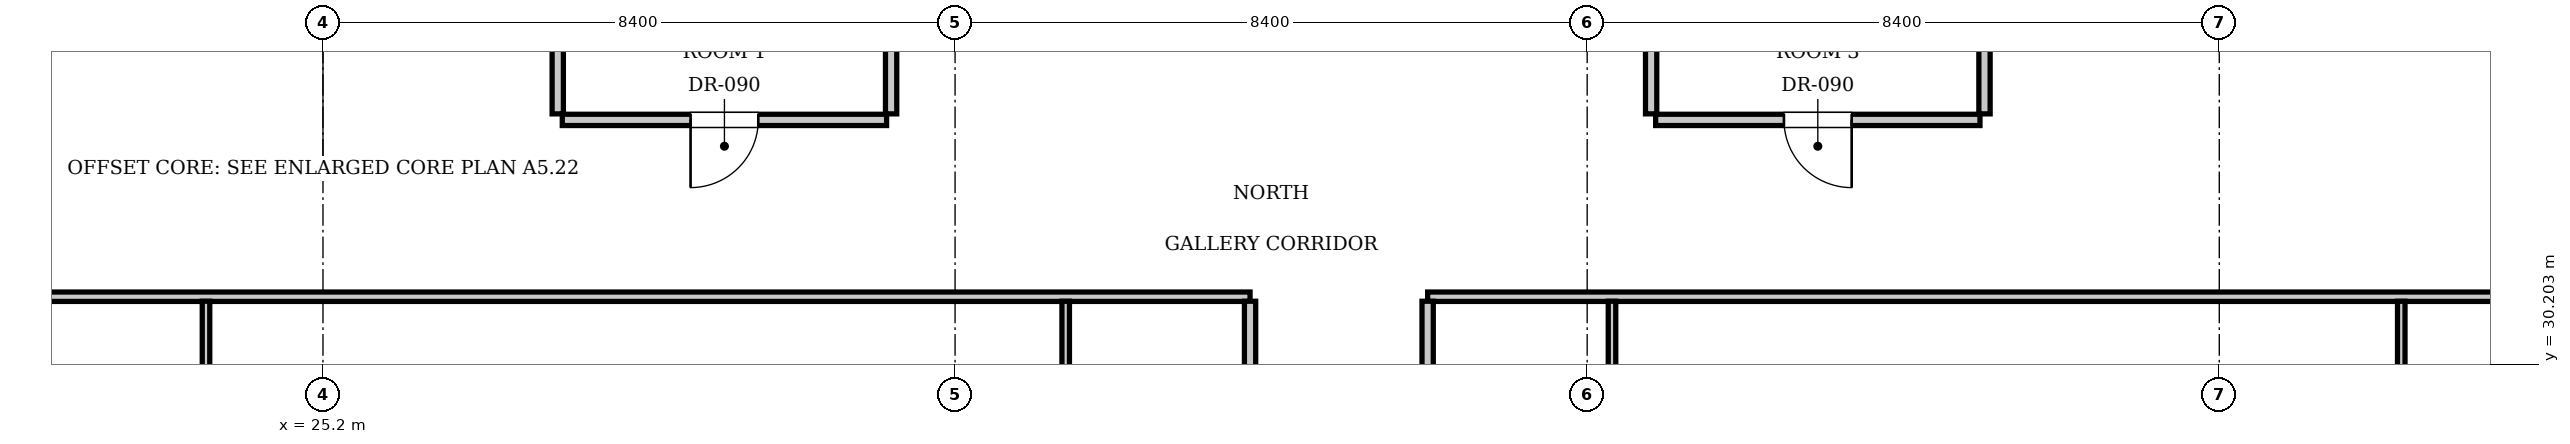
"""IFC4 building model, lengths in metres.
Left out: names, types, materials, properties, quantities, classifications, styles, units other than length and angle.
Written with IfcOpenShell. Run it as: python <this file> out.ifc"""

import sys

from ifc_helpers import new_model, si_unit, direction, frame, frame_2d, origin, place, context, subcontext, project, spatial, rectangle, extrude, element, fill, save


model = new_model("IFC4")
c1 = context("Model", 3, precision=1e-05, world=origin(), true_north=direction((0.0, 1.0)))
c2 = subcontext(c1, "Body", "Model", "MODEL_VIEW")
j1 = project(units=[si_unit("LENGTHUNIT", "METRE"), si_unit("PLANEANGLEUNIT", "RADIAN")], contexts=[c1])
p1 = place(None, origin())
s1 = spatial("IfcSite", under=j1, at=p1, CompositionType="ELEMENT")
p2 = place(p1, origin())
s2 = spatial("IfcBuilding", under=s1, at=p2, CompositionType="ELEMENT")
p3 = place(p2, frame((0.0, 0.0, 181.3)))
s3 = spatial("IfcBuildingStorey", under=s2, at=p3, CompositionType="ELEMENT", Elevation=181.3)
for number, where, z_axis, x_axis in (
    (1, (28.32, 33.53, 0.0), (0.0, 0.0, 1.0), (0.0, 1.0, 0.0)),
    (2, (32.75, 33.53, 0.0), (0.0, 0.0, 1.0), (0.0, 1.0, 0.0)),
):
    element("IfcWall", number, at=place(p3, frame(where, z_axis=z_axis, x_axis=x_axis)), inside=s3, PredefinedType="PARTITIONING", context=c2, shape_type="SweptSolid", body=[
        extrude(rectangle(XDim=2.59, YDim=0.15, at=frame_2d((1.295, 0.0))), origin(), (0.0, 0.0, 1.0), 3.61),
    ])
p4 = place(p3, frame((28.38, 33.45, 0.0), z_axis=(0.0, 0.0, 1.0), x_axis=(1.0, 0.0, 0.0)))
e3 = element("IfcWall", 3, at=p4, inside=s3, PredefinedType="PARTITIONING", context=c2, shape_type="SweptSolid", body=[
    extrude(rectangle(XDim=4.31, YDim=0.15, at=frame_2d((2.155, 0.0))), origin(), (0.0, 0.0, 1.0), 3.61),
])
p5 = place(p4, frame((1.705, 0.0, 0.0)))
e4 = element("IfcOpeningElement", 4, at=p5, cuts=e3, PredefinedType="OPENING", context=c2, shape_type="SweptSolid", body=[
    extrude(rectangle(XDim=0.9, YDim=2.1, at=frame_2d((0.45, 1.05))), frame((0.0, 0.085, 0.0), z_axis=(0.0, -1.0, 0.0), x_axis=(1.0, 0.0, 0.0)), (0.0, 0.0, 1.0), 0.17),
])
for number, where, z_axis, x_axis in (
    (5, (42.85, 33.53, 0.0), (0.0, 0.0, 1.0), (0.0, 1.0, 0.0)),
    (6, (47.28, 33.53, 0.0), (0.0, 0.0, 1.0), (0.0, 1.0, 0.0)),
):
    element("IfcWall", number, at=place(p3, frame(where, z_axis=z_axis, x_axis=x_axis)), inside=s3, PredefinedType="PARTITIONING", context=c2, shape_type="SweptSolid", body=[
        extrude(rectangle(XDim=2.59, YDim=0.15, at=frame_2d((1.295, 0.0))), origin(), (0.0, 0.0, 1.0), 3.61),
    ])
p6 = place(p3, frame((42.91, 33.45, 0.0), z_axis=(0.0, 0.0, 1.0), x_axis=(1.0, 0.0, 0.0)))
e7 = element("IfcWall", 7, at=p6, inside=s3, PredefinedType="PARTITIONING", context=c2, shape_type="SweptSolid", body=[
    extrude(rectangle(XDim=4.31, YDim=0.15, at=frame_2d((2.155, 0.0))), origin(), (0.0, 0.0, 1.0), 3.61),
])
p7 = place(p6, frame((1.705, 0.0, 0.0)))
e8 = element("IfcOpeningElement", 8, at=p7, cuts=e7, PredefinedType="OPENING", context=c2, shape_type="SweptSolid", body=[
    extrude(rectangle(XDim=0.9, YDim=2.1, at=frame_2d((0.45, 1.05))), frame((0.0, 0.085, 0.0), z_axis=(0.0, -1.0, 0.0), x_axis=(1.0, 0.0, 0.0)), (0.0, 0.0, 1.0), 0.17),
])
p8 = place(p3, frame((13.2, 31.1, 0.0), z_axis=(0.0, 0.0, 1.0), x_axis=(1.0, 0.0, 0.0)))
e9 = element("IfcWall", 9, at=p8, inside=s3, PredefinedType="PARTITIONING", context=c2, shape_type="SweptSolid", body=[
    extrude(rectangle(XDim=24.32, YDim=0.125, at=frame_2d((12.16, 0.0))), origin(), (0.0, 0.0, 1.0), 3.61),
])
p9 = place(p3, frame((39.88, 31.1, 0.0), z_axis=(0.0, 0.0, 1.0), x_axis=(1.0, 0.0, 0.0)))
e10 = element("IfcWall", 10, at=p9, inside=s3, PredefinedType="PARTITIONING", context=c2, shape_type="SweptSolid", body=[
    extrude(rectangle(XDim=22.52, YDim=0.125, at=frame_2d((11.26, 0.0))), origin(), (0.0, 0.0, 1.0), 3.61),
])
p10 = place(p3, frame((37.52, 29.15, 0.0), z_axis=(0.0, 0.0, 1.0), x_axis=(0.0, 1.0, 0.0)))
e11 = element("IfcWall", 11, at=p10, inside=s3, PredefinedType="PARTITIONING", context=c2, shape_type="SweptSolid", body=[
    extrude(rectangle(XDim=1.89, YDim=0.15, at=frame_2d((0.945, 0.0))), origin(), (0.0, 0.0, 1.0), 3.61),
])
p11 = place(p3, frame((35.07, 29.15, 0.0), z_axis=(0.0, 0.0, 1.0), x_axis=(0.0, 1.0, 0.0)))
e12 = element("IfcWall", 12, at=p11, inside=s3, PredefinedType="PARTITIONING", context=c2, shape_type="SweptSolid", body=[
    extrude(rectangle(XDim=1.89, YDim=0.1, at=frame_2d((0.945, 0.0))), origin(), (0.0, 0.0, 1.0), 3.61),
])
p12 = place(p3, frame((23.646, 27.06, 0.0), z_axis=(0.0, 0.0, 1.0), x_axis=(0.0, 1.0, 0.0)))
e13 = element("IfcWall", 13, at=p12, inside=s3, PredefinedType="PARTITIONING", context=c2, shape_type="SweptSolid", body=[
    extrude(rectangle(XDim=3.98, YDim=0.1, at=frame_2d((1.99, 0.0))), origin(), (0.0, 0.0, 1.0), 3.61),
])
p13 = place(p12, frame((1.54, 0.0, 0.0)))
e14 = element("IfcOpeningElement", 14, at=p13, cuts=e13, PredefinedType="OPENING", context=c2, shape_type="SweptSolid", body=[
    extrude(rectangle(XDim=0.9, YDim=2.1, at=frame_2d((0.45, 1.05))), frame((0.0, 0.06, 0.0), z_axis=(0.0, -1.0, 0.0), x_axis=(1.0, 0.0, 0.0)), (0.0, 0.0, 1.0), 0.12),
])
p14 = place(p3, frame((39.88, 29.15, 0.0), z_axis=(0.0, 0.0, 1.0), x_axis=(0.0, 1.0, 0.0)))
e15 = element("IfcWall", 15, at=p14, inside=s3, PredefinedType="PARTITIONING", context=c2, shape_type="SweptSolid", body=[
    extrude(rectangle(XDim=1.89, YDim=0.15, at=frame_2d((0.945, 0.0))), origin(), (0.0, 0.0, 1.0), 3.61),
])
p15 = place(p3, frame((42.33, 29.15, 0.0), z_axis=(0.0, 0.0, 1.0), x_axis=(0.0, 1.0, 0.0)))
e16 = element("IfcWall", 16, at=p15, inside=s3, PredefinedType="PARTITIONING", context=c2, shape_type="SweptSolid", body=[
    extrude(rectangle(XDim=1.89, YDim=0.1, at=frame_2d((0.945, 0.0))), origin(), (0.0, 0.0, 1.0), 3.61),
])
p16 = place(p3, frame((52.818, 27.06, 0.0), z_axis=(0.0, 0.0, 1.0), x_axis=(0.0, 1.0, 0.0)))
e17 = element("IfcWall", 17, at=p16, inside=s3, PredefinedType="PARTITIONING", context=c2, shape_type="SweptSolid", body=[
    extrude(rectangle(XDim=3.98, YDim=0.1, at=frame_2d((1.99, 0.0))), origin(), (0.0, 0.0, 1.0), 3.61),
])
p17 = place(p16, frame((1.54, 0.0, 0.0)))
e18 = element("IfcOpeningElement", 18, at=p17, cuts=e17, PredefinedType="OPENING", context=c2, shape_type="SweptSolid", body=[
    extrude(rectangle(XDim=0.9, YDim=2.1, at=frame_2d((0.45, 1.05))), frame((0.0, 0.06, 0.0), z_axis=(0.0, -1.0, 0.0), x_axis=(1.0, 0.0, 0.0)), (0.0, 0.0, 1.0), 0.12),
])
p18 = place(p5, frame((0.9, 0.0, 0.0), z_axis=(0.0, 0.0, 1.0), x_axis=(-1.0, 0.0, 0.0)))
e19 = element("IfcDoor", 19, at=p18, inside=s3, OperationType="SINGLE_SWING_RIGHT", PredefinedType="DOOR", context=c2, shape_type="SweptSolid", body=[
    extrude(rectangle(XDim=0.9, YDim=2.1, at=frame_2d((0.45, 1.05))), frame((0.0, 0.025, 0.0), z_axis=(0.0, -1.0, 0.0), x_axis=(1.0, 0.0, 0.0)), (0.0, 0.0, 1.0), 0.05),
])
fill(e4, e19)
p19 = place(p7, frame((0.9, 0.0, 0.0), z_axis=(0.0, 0.0, 1.0), x_axis=(-1.0, 0.0, 0.0)))
e20 = element("IfcDoor", 20, at=p19, inside=s3, OperationType="SINGLE_SWING_LEFT", PredefinedType="DOOR", context=c2, shape_type="SweptSolid", body=[
    extrude(rectangle(XDim=0.9, YDim=2.1, at=frame_2d((0.45, 1.05))), frame((0.0, 0.025, 0.0), z_axis=(0.0, -1.0, 0.0), x_axis=(1.0, 0.0, 0.0)), (0.0, 0.0, 1.0), 0.05),
])
fill(e8, e20)
save(model, sys.argv[1])
